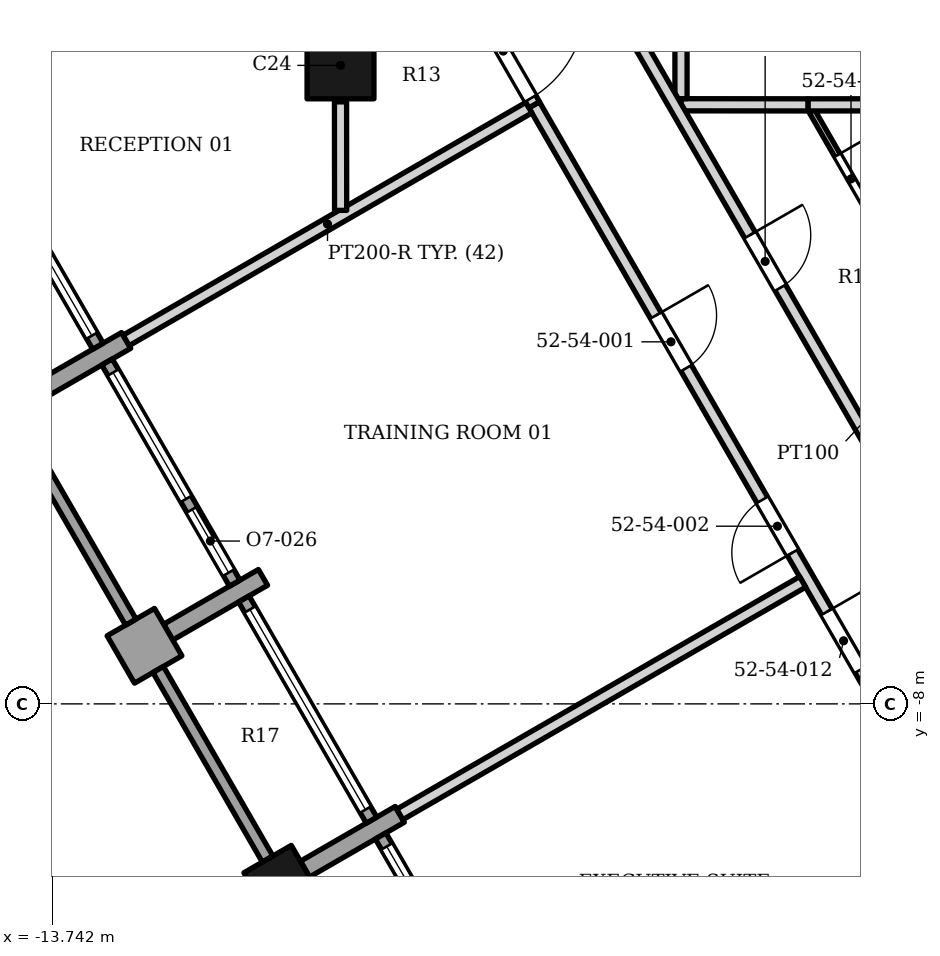
"""IFC4 building model, lengths in metres.
Left out: names, types, materials, properties, quantities, classifications, styles, units other than length and angle.
Written with IfcOpenShell. Run it as: python <this file> out.ifc"""

import sys

from ifc_helpers import new_model, si_unit, direction, frame, frame_2d, origin, origin_2d, place, context, subcontext, project, spatial, rectangle, extrude, element, fill, save


model = new_model("IFC4")
c1 = context("Model", 3, precision=1e-05, world=origin(), true_north=direction((0.0, 1.0)))
c2 = subcontext(c1, "Body", "Model", "MODEL_VIEW")
j1 = project(units=[si_unit("LENGTHUNIT", "METRE"), si_unit("PLANEANGLEUNIT", "RADIAN")], contexts=[c1])
p1 = place(None, origin())
s1 = spatial("IfcSite", under=j1, at=p1, CompositionType="ELEMENT")
p2 = place(p1, origin())
s2 = spatial("IfcBuilding", under=s1, at=p2, CompositionType="ELEMENT")
p3 = place(p2, frame((0.0, 0.0, 219.8)))
s3 = spatial("IfcBuildingStorey", under=s2, at=p3, CompositionType="ELEMENT", Elevation=219.8)
p4 = place(p3, frame((-9.0, 2.5, 0.0), z_axis=(0.0, 0.0, 1.0), x_axis=(1.0, 0.0, 0.0)))
e1 = element("IfcColumn", 1, at=p4, inside=s3, PredefinedType="COLUMN", context=c2, shape_type="SweptSolid", body=[
    extrude(rectangle(XDim=1.1, YDim=1.1, at=origin_2d()), origin(), (0.0, 0.0, 1.0), 3.9),
])
p5 = place(p3, frame((-9.974, -10.942, 0.0), z_axis=(0.0, 0.0, 1.0), x_axis=(0.5, -0.866025403784, 0.0)))
e2 = element("IfcColumn", 2, at=p5, inside=s3, PredefinedType="COLUMN", context=c2, shape_type="SweptSolid", body=[
    extrude(rectangle(XDim=0.9, YDim=0.9, at=origin_2d()), origin(), (0.0, 0.0, 1.0), 3.9),
])
p6 = place(p3, frame((-14.084, -2.923, 0.0), z_axis=(0.0, 0.0, 1.0), x_axis=(0.866047807691, 0.499961193289, 0.0)))
e3 = element("IfcWall", 3, at=p6, inside=s3, PredefinedType="SOLIDWALL", context=c2, shape_type="SweptSolid", body=[
    extrude(rectangle(XDim=1.8, YDim=0.3, at=frame_2d((0.9, 0.0))), origin(), (0.0, 0.0, 1.0), 3.0),
])
p7 = place(p3, frame((-11.834, -6.82, 0.0), z_axis=(0.0, 0.0, 1.0), x_axis=(-0.866081705922, -0.499902469156, 0.0)))
e4 = element("IfcWall", 4, at=p7, inside=s3, PredefinedType="SOLIDWALL", context=c2, shape_type="SweptSolid", body=[
    extrude(rectangle(XDim=0.9, YDim=0.9, at=frame_2d((0.45, 0.0))), origin(), (0.0, 0.0, 1.0), 3.0),
])
for number, where, z_axis, x_axis in (
    (5, (-11.834, -6.82, 0.0), (0.0, 0.0, 1.0), (0.866, 0.5, 0.0)),
    (6, (-9.584, -10.717, 0.0), (0.0, 0.0, 1.0), (0.866, 0.5, 0.0)),
):
    element("IfcWall", number, at=place(p3, frame(where, z_axis=z_axis, x_axis=x_axis)), inside=s3, PredefinedType="SOLIDWALL", context=c2, shape_type="SweptSolid", body=[
        extrude(rectangle(XDim=1.8, YDim=0.3, at=frame_2d((0.9, 0.0))), origin(), (0.0, 0.0, 1.0), 3.0),
    ])
p8 = place(p3, frame((-15.09, 1.519, 0.0), z_axis=(0.0, 0.0, 1.0), x_axis=(0.49998411664, -0.866034573852, 0.0)))
e7 = element("IfcWall", 7, at=p8, inside=s3, PredefinedType="ELEMENTEDWALL", context=c2, shape_type="SweptSolid", body=[
    extrude(rectangle(XDim=4.2, YDim=0.2, at=frame_2d((2.1, 0.0))), origin(), (0.0, 0.0, 1.0), 3.0),
])
p9 = place(p8, frame((0.2, 0.0, 0.45)))
e8 = element("IfcOpeningElement", 8, at=p9, cuts=e7, PredefinedType="OPENING", context=c2, shape_type="SweptSolid", body=[
    extrude(rectangle(XDim=3.8, YDim=2.25, at=frame_2d((1.9, 1.125))), frame((0.0, 0.11, 0.0), z_axis=(0.0, -1.0, 0.0), x_axis=(1.0, 0.0, 0.0)), (0.0, 0.0, 1.0), 0.22),
])
p10 = place(p3, frame((-14.249, -3.538, 0.0), z_axis=(0.0, 0.0, 1.0), x_axis=(0.500012057535, -0.866018442252, 0.0)))
e9 = element("IfcWall", 9, at=p10, inside=s3, PredefinedType="SOLIDWALL", context=c2, shape_type="SweptSolid", body=[
    extrude(rectangle(XDim=3.6, YDim=0.2, at=frame_2d((1.8, 0.0))), origin(), (0.0, 0.0, 1.0), 3.0),
])
p11 = place(p3, frame((-12.84, -2.378, 0.0), z_axis=(0.0, 0.0, 1.0), x_axis=(0.499958946799, -0.866049104564, 0.0)))
e10 = element("IfcWall", 10, at=p11, inside=s3, PredefinedType="ELEMENTEDWALL", context=c2, shape_type="SweptSolid", body=[
    extrude(rectangle(XDim=4.2, YDim=0.2, at=frame_2d((2.1, 0.0))), origin(), (0.0, 0.0, 1.0), 3.0),
])
p12 = place(p11, frame((0.2, 0.0, 0.45)))
e11 = element("IfcOpeningElement", 11, at=p12, cuts=e10, PredefinedType="OPENING", context=c2, shape_type="SweptSolid", body=[
    extrude(rectangle(XDim=2.4, YDim=2.25, at=frame_2d((1.2, 1.125))), frame((0.0, 0.11, 0.0), z_axis=(0.0, -1.0, 0.0), x_axis=(1.0, 0.0, 0.0)), (0.0, 0.0, 1.0), 0.22),
])
p13 = place(p11, frame((2.8, 0.0, 0.0)))
e12 = element("IfcOpeningElement", 12, at=p13, cuts=e10, PredefinedType="OPENING", context=c2, shape_type="SweptSolid", body=[
    extrude(rectangle(XDim=1.2, YDim=2.7, at=frame_2d((0.6, 1.35))), frame((0.0, 0.11, 0.0), z_axis=(0.0, -1.0, 0.0), x_axis=(1.0, 0.0, 0.0)), (0.0, 0.0, 1.0), 0.22),
])
p14 = place(p3, frame((-11.999, -7.435, 0.0), z_axis=(0.0, 0.0, 1.0), x_axis=(0.499982693035, -0.866035395735, 0.0)))
e13 = element("IfcWall", 13, at=p14, inside=s3, PredefinedType="SOLIDWALL", context=c2, shape_type="SweptSolid", body=[
    extrude(rectangle(XDim=3.6, YDim=0.2, at=frame_2d((1.8, 0.0))), origin(), (0.0, 0.0, 1.0), 3.0),
])
p15 = place(p3, frame((-10.59, -6.275, 0.0), z_axis=(0.0, 0.0, 1.0), x_axis=(0.49998411664, -0.866034573852, 0.0)))
e14 = element("IfcWall", 14, at=p15, inside=s3, PredefinedType="ELEMENTEDWALL", context=c2, shape_type="SweptSolid", body=[
    extrude(rectangle(XDim=4.2, YDim=0.2, at=frame_2d((2.1, 0.0))), origin(), (0.0, 0.0, 1.0), 3.0),
])
p16 = place(p15, frame((0.2, 0.0, 0.45)))
e15 = element("IfcOpeningElement", 15, at=p16, cuts=e14, PredefinedType="OPENING", context=c2, shape_type="SweptSolid", body=[
    extrude(rectangle(XDim=3.8, YDim=2.25, at=frame_2d((1.9, 1.125))), frame((0.0, 0.11, 0.0), z_axis=(0.0, -1.0, 0.0), x_axis=(1.0, 0.0, 0.0)), (0.0, 0.0, 1.0), 0.22),
])
p17 = place(p3, frame((-8.34, -10.172, 0.0), z_axis=(0.0, 0.0, 1.0), x_axis=(0.499958946799, -0.866049104564, 0.0)))
e16 = element("IfcWall", 16, at=p17, inside=s3, PredefinedType="ELEMENTEDWALL", context=c2, shape_type="SweptSolid", body=[
    extrude(rectangle(XDim=4.2, YDim=0.2, at=frame_2d((2.1, 0.0))), origin(), (0.0, 0.0, 1.0), 2.95),
])
p18 = place(p17, frame((0.2, 0.0, 0.45)))
e17 = element("IfcOpeningElement", 17, at=p18, cuts=e16, PredefinedType="OPENING", context=c2, shape_type="SweptSolid", body=[
    extrude(rectangle(XDim=2.4, YDim=2.25, at=frame_2d((1.2, 1.125))), frame((0.0, 0.11, 0.0), z_axis=(0.0, -1.0, 0.0), x_axis=(1.0, 0.0, 0.0)), (0.0, 0.0, 1.0), 0.22),
])
p19 = place(p17, frame((2.8, 0.0, 0.0)))
e18 = element("IfcOpeningElement", 18, at=p19, cuts=e16, PredefinedType="OPENING", context=c2, shape_type="SweptSolid", body=[
    extrude(rectangle(XDim=1.2, YDim=2.7, at=frame_2d((0.6, 1.35))), frame((0.0, 0.11, 0.0), z_axis=(0.0, -1.0, 0.0), x_axis=(1.0, 0.0, 0.0)), (0.0, 0.0, 1.0), 0.22),
])
p20 = place(p3, frame((-5.815, 1.851, 0.0), z_axis=(0.0, 0.0, 1.0), x_axis=(0.499991042018, -0.866030575616, 0.0)))
e19 = element("IfcWall", 19, at=p20, inside=s3, PredefinedType="PARTITIONING", context=c2, shape_type="SweptSolid", body=[
    extrude(rectangle(XDim=11.357, YDim=0.2, at=frame_2d((5.678, 0.0))), origin(), (0.0, 0.0, 1.0), 2.884),
])
p21 = place(p20, frame((4.0, 0.0, 0.0)))
e20 = element("IfcOpeningElement", 20, at=p21, cuts=e19, PredefinedType="OPENING", context=c2, shape_type="SweptSolid", body=[
    extrude(rectangle(XDim=1.0, YDim=2.1, at=frame_2d((0.5, 1.05))), frame((0.0, 0.11, 0.0), z_axis=(0.0, -1.0, 0.0), x_axis=(1.0, 0.0, 0.0)), (0.0, 0.0, 1.0), 0.22),
])
p22 = place(p20, frame((7.501, 0.0, 0.0)))
e21 = element("IfcOpeningElement", 21, at=p22, cuts=e19, PredefinedType="OPENING", context=c2, shape_type="SweptSolid", body=[
    extrude(rectangle(XDim=1.0, YDim=2.1, at=frame_2d((0.5, 1.05))), frame((0.0, 0.11, 0.0), z_axis=(0.0, -1.0, 0.0), x_axis=(1.0, 0.0, 0.0)), (0.0, 0.0, 1.0), 0.22),
])
p23 = place(p20, frame((9.627, 0.0, 0.0)))
e22 = element("IfcOpeningElement", 22, at=p23, cuts=e19, PredefinedType="OPENING", context=c2, shape_type="SweptSolid", body=[
    extrude(rectangle(XDim=1.1, YDim=2.1, at=frame_2d((0.55, 1.05))), frame((0.0, 0.11, 0.0), z_axis=(0.0, -1.0, 0.0), x_axis=(1.0, 0.0, 0.0)), (0.0, 0.0, 1.0), 0.22),
])
p24 = place(p3, frame((-8.025, -9.817, 0.0), z_axis=(0.0, 0.0, 1.0), x_axis=(0.866115970796, 0.499843100514, 0.0)))
e23 = element("IfcWall", 23, at=p24, inside=s3, PredefinedType="PARTITIONING", context=c2, shape_type="SweptSolid", body=[
    extrude(rectangle(XDim=7.649, YDim=0.2, at=frame_2d((3.825, 0.0))), origin(), (0.0, 0.0, 1.0), 2.884),
])
p25 = place(p3, frame((-12.525, -2.022, 0.0), z_axis=(0.0, 0.0, 1.0), x_axis=(0.865836806481, 0.500326517929, 0.0)))
e24 = element("IfcWall", 24, at=p25, inside=s3, PredefinedType="PARTITIONING", context=c2, shape_type="SweptSolid", body=[
    extrude(rectangle(XDim=7.649, YDim=0.2, at=frame_2d((3.825, 0.0))), origin(), (0.0, 0.0, 1.0), 3.052),
])
p26 = place(p3, frame((-1.258, 1.766, 0.0), z_axis=(0.0, 0.0, 1.0), x_axis=(0.50002892151, -0.866008705299, 0.0)))
e25 = element("IfcWall", 25, at=p26, inside=s3, PredefinedType="PARTITIONING", context=c2, shape_type="SweptSolid", body=[
    extrude(rectangle(XDim=2.666, YDim=0.1, at=frame_2d((1.333, 0.0))), origin(), (0.0, 0.0, 1.0), 2.884),
])
p27 = place(p26, frame((0.858, 0.0, 0.0)))
e26 = element("IfcOpeningElement", 26, at=p27, cuts=e25, PredefinedType="OPENING", context=c2, shape_type="SweptSolid", body=[
    extrude(rectangle(XDim=0.9, YDim=2.1, at=frame_2d((0.45, 1.05))), frame((0.0, 0.06, 0.0), z_axis=(0.0, -1.0, 0.0), x_axis=(1.0, 0.0, 0.0)), (0.0, 0.0, 1.0), 0.12),
])
p28 = place(p3, frame((-6.803, 3.565, 0.0), z_axis=(0.0, 0.0, 1.0), x_axis=(0.49997529981, -0.866039663976, 0.0)))
e27 = element("IfcWall", 27, at=p28, inside=s3, PredefinedType="PARTITIONING", context=c2, shape_type="SweptSolid", body=[
    extrude(rectangle(XDim=1.978, YDim=0.2, at=frame_2d((0.989, 0.0))), origin(), (0.0, 0.0, 1.0), 3.73),
])
p29 = place(p28, frame((0.058, 0.0, 0.0)))
e28 = element("IfcOpeningElement", 28, at=p29, cuts=e27, PredefinedType="OPENING", context=c2, shape_type="SweptSolid", body=[
    extrude(rectangle(XDim=1.8, YDim=2.4, at=frame_2d((0.9, 1.2))), frame((0.0, 0.11, 0.0), z_axis=(0.0, -1.0, 0.0), x_axis=(1.0, 0.0, 0.0)), (0.0, 0.0, 1.0), 0.22),
])
p30 = place(p3, frame((-3.4, 1.852, 0.0), z_axis=(0.0, 0.0, 1.0), x_axis=(0.999999666027, -0.000817279353, 0.0)))
e29 = element("IfcWall", 29, at=p30, inside=s3, PredefinedType="PARTITIONING", context=c2, shape_type="SweptSolid", body=[
    extrude(rectangle(XDim=2.091, YDim=0.2, at=frame_2d((1.045, 0.0))), origin(), (0.0, 0.0, 1.0), 3.73),
])
p31 = place(p3, frame((-1.309, 1.851, 0.0), z_axis=(0.0, 0.0, 1.0), x_axis=(0.999999934138, 0.000362938743, 0.0)))
e30 = element("IfcWall", 30, at=p31, inside=s3, PredefinedType="PARTITIONING", context=c2, shape_type="SweptSolid", body=[
    extrude(rectangle(XDim=4.709, YDim=0.2, at=frame_2d((2.354, 0.0))), origin(), (0.0, 0.0, 1.0), 3.73),
])
p32 = place(p3, frame((-9.0, 1.9, 0.0), z_axis=(0.0, 0.0, 1.0), x_axis=(0.000957853967, -0.999999541258, 0.0)))
e31 = element("IfcWall", 31, at=p32, inside=s3, PredefinedType="PARTITIONING", context=c2, shape_type="SweptSolid", body=[
    extrude(rectangle(XDim=1.784, YDim=0.2, at=frame_2d((0.892, 0.0))), origin(), (0.0, 0.0, 1.0), 3.052),
])
p33 = place(p3, frame((-3.4, 3.852, 0.0), z_axis=(0.0, 0.0, 1.0), x_axis=(0.0, -1.0, 0.0)))
e32 = element("IfcWall", 32, at=p33, inside=s3, PredefinedType="PARTITIONING", context=c2, shape_type="SweptSolid", body=[
    extrude(rectangle(XDim=1.9, YDim=0.2, at=frame_2d((0.95, 0.0))), origin(), (0.0, 0.0, 1.0), 3.73),
])
p34 = place(p3, frame((-4.658, 3.852, 0.0), z_axis=(0.0, 0.0, 1.0), x_axis=(0.500012400782, -0.866018244071, 0.0)))
e33 = element("IfcWall", 33, at=p34, inside=s3, PredefinedType="PARTITIONING", context=c2, shape_type="SweptSolid", body=[
    extrude(rectangle(XDim=10.569, YDim=0.2, at=frame_2d((5.284, 0.0))), origin(), (0.0, 0.0, 1.0), 2.884),
])
p35 = place(p34, frame((4.784, 0.0, 0.0)))
e34 = element("IfcOpeningElement", 34, at=p35, cuts=e33, PredefinedType="OPENING", context=c2, shape_type="SweptSolid", body=[
    extrude(rectangle(XDim=1.0, YDim=2.1, at=frame_2d((0.5, 1.05))), frame((0.0, 0.11, 0.0), z_axis=(0.0, -1.0, 0.0), x_axis=(1.0, 0.0, 0.0)), (0.0, 0.0, 1.0), 0.22),
])
p36 = place(p9, origin())
e35 = element("IfcWindow", 35, at=p36, inside=s3, PartitioningType="SINGLE_PANEL", PredefinedType="WINDOW", context=c2, shape_type="SweptSolid", body=[
    extrude(rectangle(XDim=3.8, YDim=2.25, at=frame_2d((1.9, 1.125))), frame((0.0, 0.03, 0.0), z_axis=(0.0, -1.0, 0.0), x_axis=(1.0, 0.0, 0.0)), (0.0, 0.0, 1.0), 0.06),
])
fill(e8, e35)
p37 = place(p12, origin())
e36 = element("IfcWindow", 36, at=p37, inside=s3, PartitioningType="SINGLE_PANEL", PredefinedType="WINDOW", context=c2, shape_type="SweptSolid", body=[
    extrude(rectangle(XDim=2.4, YDim=2.25, at=frame_2d((1.2, 1.125))), frame((0.0, 0.03, 0.0), z_axis=(0.0, -1.0, 0.0), x_axis=(1.0, 0.0, 0.0)), (0.0, 0.0, 1.0), 0.06),
])
fill(e11, e36)
p38 = place(p13, origin())
e37 = element("IfcDoor", 37, at=p38, inside=s3, OperationType="SINGLE_SWING_LEFT", PredefinedType="DOOR", context=c2, shape_type="SweptSolid", body=[
    extrude(rectangle(XDim=1.2, YDim=2.7, at=frame_2d((0.6, 1.35))), frame((0.0, 0.025, 0.0), z_axis=(0.0, -1.0, 0.0), x_axis=(1.0, 0.0, 0.0)), (0.0, 0.0, 1.0), 0.05),
])
fill(e12, e37)
p39 = place(p16, origin())
e38 = element("IfcWindow", 38, at=p39, inside=s3, PartitioningType="SINGLE_PANEL", PredefinedType="WINDOW", context=c2, shape_type="SweptSolid", body=[
    extrude(rectangle(XDim=3.8, YDim=2.25, at=frame_2d((1.9, 1.125))), frame((0.0, 0.03, 0.0), z_axis=(0.0, -1.0, 0.0), x_axis=(1.0, 0.0, 0.0)), (0.0, 0.0, 1.0), 0.06),
])
fill(e15, e38)
p40 = place(p18, origin())
e39 = element("IfcWindow", 39, at=p40, inside=s3, PartitioningType="SINGLE_PANEL", PredefinedType="WINDOW", context=c2, shape_type="SweptSolid", body=[
    extrude(rectangle(XDim=2.4, YDim=2.25, at=frame_2d((1.2, 1.125))), frame((0.0, 0.03, 0.0), z_axis=(0.0, -1.0, 0.0), x_axis=(1.0, 0.0, 0.0)), (0.0, 0.0, 1.0), 0.06),
])
fill(e17, e39)
p41 = place(p21, origin())
e40 = element("IfcDoor", 40, at=p41, inside=s3, OperationType="SINGLE_SWING_LEFT", PredefinedType="DOOR", context=c2, shape_type="SweptSolid", body=[
    extrude(rectangle(XDim=1.0, YDim=2.1, at=frame_2d((0.5, 1.05))), frame((0.0, 0.025, 0.0), z_axis=(0.0, -1.0, 0.0), x_axis=(1.0, 0.0, 0.0)), (0.0, 0.0, 1.0), 0.05),
])
fill(e20, e40)
p42 = place(p22, origin())
e41 = element("IfcDoor", 41, at=p42, inside=s3, OperationType="SINGLE_SWING_RIGHT", PredefinedType="DOOR", context=c2, shape_type="SweptSolid", body=[
    extrude(rectangle(XDim=1.0, YDim=2.1, at=frame_2d((0.5, 1.05))), frame((0.0, 0.025, 0.0), z_axis=(0.0, -1.0, 0.0), x_axis=(1.0, 0.0, 0.0)), (0.0, 0.0, 1.0), 0.05),
])
fill(e21, e41)
p43 = place(p29, origin())
e42 = element("IfcDoor", 42, at=p43, inside=s3, OperationType="DOUBLE_DOOR_SINGLE_SWING", PredefinedType="DOOR", context=c2, shape_type="SweptSolid", body=[
    extrude(rectangle(XDim=1.8, YDim=2.4, at=frame_2d((0.9, 1.2))), frame((0.0, 0.025, 0.0), z_axis=(0.0, -1.0, 0.0), x_axis=(1.0, 0.0, 0.0)), (0.0, 0.0, 1.0), 0.05),
])
fill(e28, e42)
p44 = place(p23, origin())
e43 = element("IfcDoor", 43, at=p44, inside=s3, OperationType="SINGLE_SWING_LEFT", PredefinedType="DOOR", context=c2, shape_type="SweptSolid", body=[
    extrude(rectangle(XDim=1.1, YDim=2.1, at=frame_2d((0.55, 1.05))), frame((0.0, 0.025, 0.0), z_axis=(0.0, -1.0, 0.0), x_axis=(1.0, 0.0, 0.0)), (0.0, 0.0, 1.0), 0.05),
])
fill(e22, e43)
p45 = place(p35, origin())
e44 = element("IfcDoor", 44, at=p45, inside=s3, OperationType="SINGLE_SWING_LEFT", PredefinedType="DOOR", context=c2, shape_type="SweptSolid", body=[
    extrude(rectangle(XDim=1.0, YDim=2.1, at=frame_2d((0.5, 1.05))), frame((0.0, 0.025, 0.0), z_axis=(0.0, -1.0, 0.0), x_axis=(1.0, 0.0, 0.0)), (0.0, 0.0, 1.0), 0.05),
])
fill(e34, e44)
p46 = place(p27, origin())
e45 = element("IfcDoor", 45, at=p46, inside=s3, OperationType="SINGLE_SWING_LEFT", PredefinedType="DOOR", context=c2, shape_type="SweptSolid", body=[
    extrude(rectangle(XDim=0.9, YDim=2.1, at=frame_2d((0.45, 1.05))), frame((0.0, 0.025, 0.0), z_axis=(0.0, -1.0, 0.0), x_axis=(1.0, 0.0, 0.0)), (0.0, 0.0, 1.0), 0.05),
])
fill(e26, e45)
save(model, sys.argv[1])
